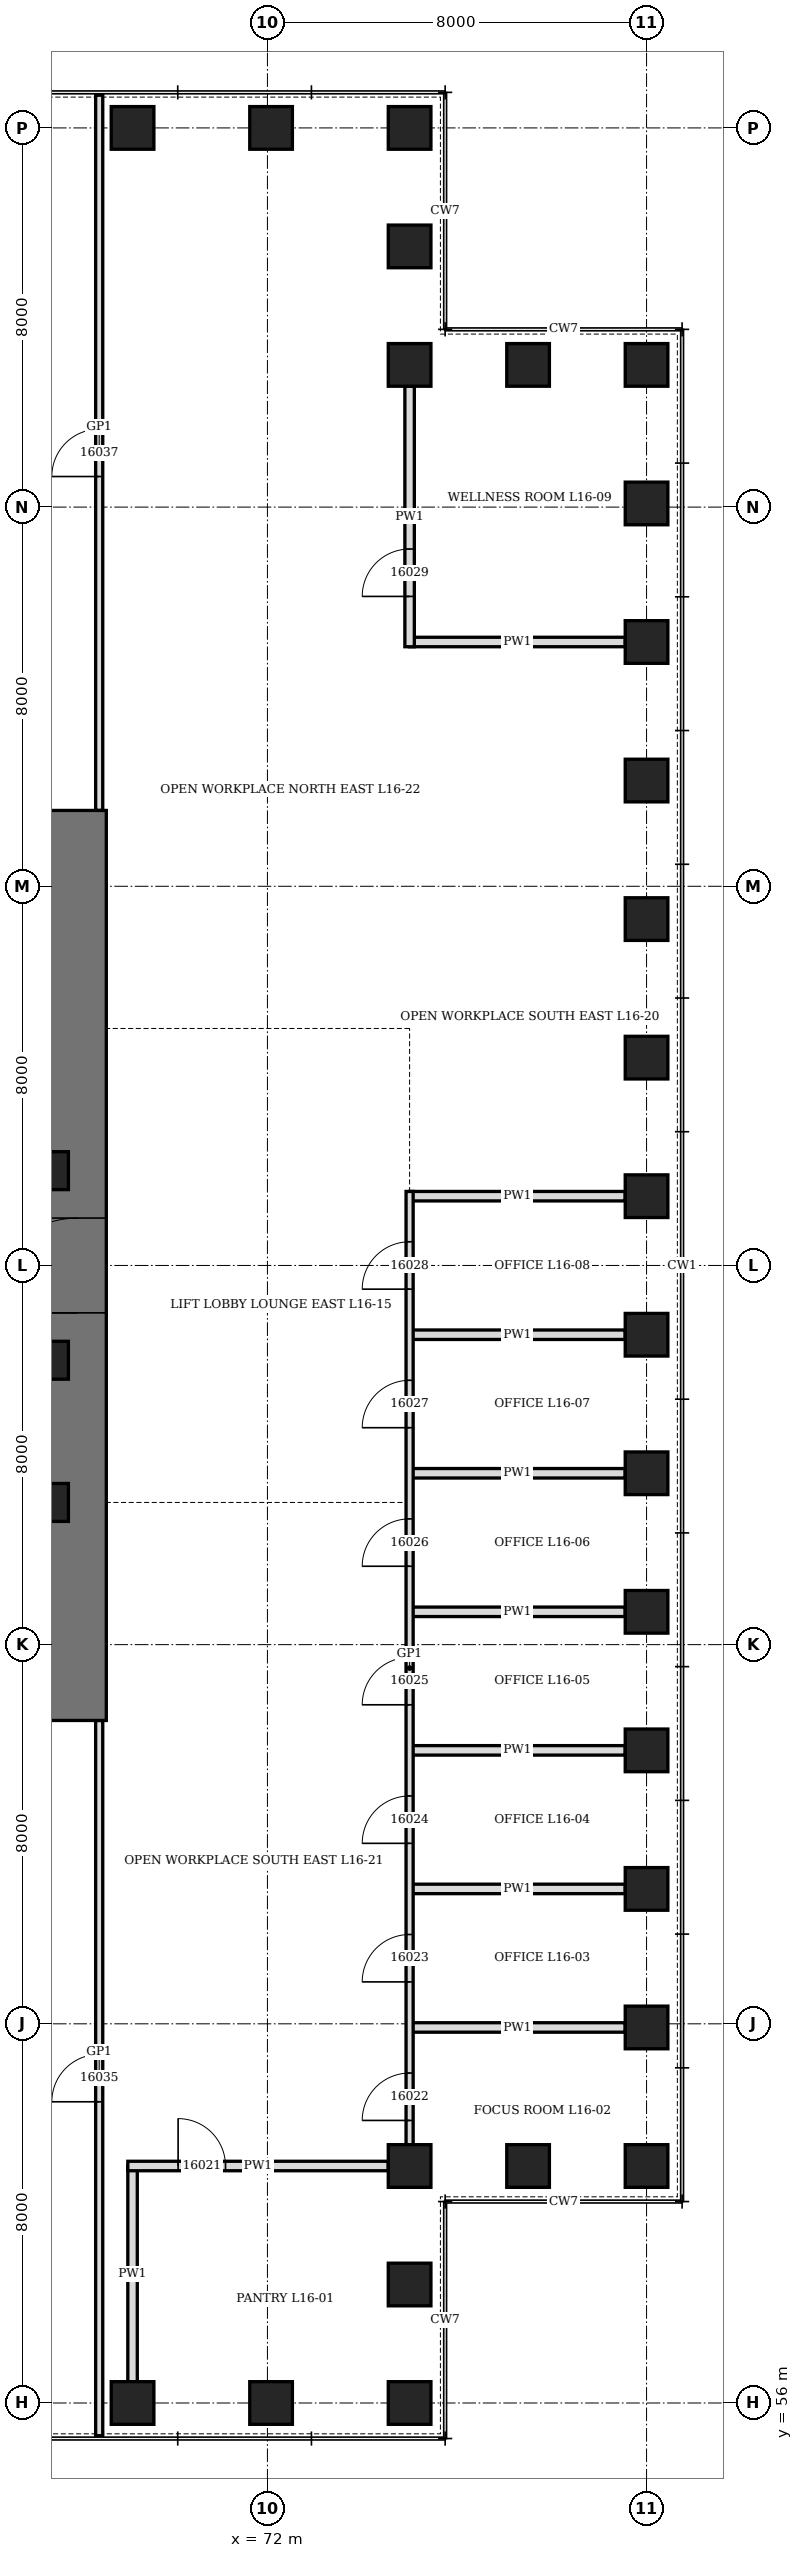
"""IFC4 building model, lengths in metres.
Left out: names, types, materials, properties, quantities, classifications, styles, units other than length and angle.
Written with IfcOpenShell. Run it as: python <this file> out.ifc"""

import sys

from ifc_helpers import new_model, si_unit, direction, frame, frame_2d, origin, origin_2d, place, context, subcontext, project, spatial, rectangle, hollow_rectangle, extrude, element, fill, save


model = new_model("IFC4")
c1 = context("Model", 3, precision=1e-05, world=origin(), true_north=direction((0.0, 1.0)))
c2 = subcontext(c1, "Body", "Model", "MODEL_VIEW")
j1 = project(units=[si_unit("LENGTHUNIT", "METRE"), si_unit("PLANEANGLEUNIT", "RADIAN")], contexts=[c1])
p1 = place(None, origin())
s1 = spatial("IfcSite", under=j1, at=p1, CompositionType="ELEMENT")
p2 = place(p1, origin())
s2 = spatial("IfcBuilding", under=s1, at=p2, CompositionType="ELEMENT")
p3 = place(p2, frame((0.0, 0.0, 76.9)))
s3 = spatial("IfcBuildingStorey", under=s2, at=p3, CompositionType="ELEMENT", Elevation=76.9)
for number, where, z_axis, x_axis in (
    (1, (69.154, 56.0, 0.0), (0.0, 0.0, 1.0), (1.0, 0.0, 0.0)),
    (2, (72.077, 56.0, 0.0), (0.0, 0.0, 1.0), (1.0, 0.0, 0.0)),
    (3, (75.0, 56.0, 0.0), (0.0, 0.0, 1.0), (0.0, 1.0, 0.0)),
    (4, (75.0, 58.5, 0.0), (0.0, 0.0, 1.0), (0.0, 1.0, 0.0)),
    (5, (75.0, 61.0, 0.0), (0.0, 0.0, 1.0), (1.0, 0.0, 0.0)),
    (6, (77.5, 61.0, 0.0), (0.0, 0.0, 1.0), (1.0, 0.0, 0.0)),
    (7, (80.0, 61.0, 0.0), (0.0, 0.0, 1.0), (0.0, 1.0, 0.0)),
    (8, (80.0, 63.923, 0.0), (0.0, 0.0, 1.0), (0.0, 1.0, 0.0)),
    (9, (80.0, 66.846, 0.0), (0.0, 0.0, 1.0), (0.0, 1.0, 0.0)),
    (10, (80.0, 69.769, 0.0), (0.0, 0.0, 1.0), (0.0, 1.0, 0.0)),
    (11, (80.0, 72.692, 0.0), (0.0, 0.0, 1.0), (0.0, 1.0, 0.0)),
    (12, (80.0, 75.615, 0.0), (0.0, 0.0, 1.0), (0.0, 1.0, 0.0)),
    (13, (80.0, 78.539, 0.0), (0.0, 0.0, 1.0), (0.0, 1.0, 0.0)),
    (14, (80.0, 81.461, 0.0), (0.0, 0.0, 1.0), (0.0, 1.0, 0.0)),
    (15, (80.0, 84.385, 0.0), (0.0, 0.0, 1.0), (0.0, 1.0, 0.0)),
    (16, (80.0, 87.308, 0.0), (0.0, 0.0, 1.0), (0.0, 1.0, 0.0)),
    (17, (80.0, 90.231, 0.0), (0.0, 0.0, 1.0), (0.0, 1.0, 0.0)),
    (18, (80.0, 93.154, 0.0), (0.0, 0.0, 1.0), (0.0, 1.0, 0.0)),
    (19, (80.0, 96.077, 0.0), (0.0, 0.0, 1.0), (0.0, 1.0, 0.0)),
    (20, (80.0, 99.0, 0.0), (0.0, 0.0, 1.0), (1.0, 0.0, 0.0)),
    (21, (77.5, 99.0, 0.0), (0.0, 0.0, 1.0), (1.0, 0.0, 0.0)),
    (22, (75.0, 99.0, 0.0), (0.0, 0.0, 1.0), (0.0, 1.0, 0.0)),
    (23, (75.0, 101.5, 0.0), (0.0, 0.0, 1.0), (0.0, 1.0, 0.0)),
    (24, (75.0, 104.0, 0.0), (0.0, 0.0, 1.0), (1.0, 0.0, 0.0)),
    (25, (72.077, 104.0, 0.0), (0.0, 0.0, 1.0), (1.0, 0.0, 0.0)),
    (26, (69.154, 104.0, 0.0), (0.0, 0.0, 1.0), (1.0, 0.0, 0.0)),
):
    element("IfcColumn", number, at=place(p3, frame(where, z_axis=z_axis, x_axis=x_axis)), inside=s3, PredefinedType="COLUMN", context=c2, shape_type="SweptSolid", body=[
        extrude(hollow_rectangle(XDim=0.9, YDim=0.9, WallThickness=0.12, at=origin_2d()), origin(), (0.0, 0.0, 1.0), 4.2),
    ])
p4 = place(p3, frame((68.0, 70.4, 0.0), z_axis=(0.0, 0.0, 1.0), x_axis=(0.0, 1.0, 0.0)))
e27 = element("IfcWall", 27, at=p4, inside=s3, PredefinedType="SHEAR", context=c2, shape_type="SweptSolid", body=[
    extrude(rectangle(XDim=19.2, YDim=1.2, at=frame_2d((9.6, 0.0))), origin(), (0.0, 0.0, 1.0), 4.2),
])
p5 = place(p4, frame((8.6, 0.0, 0.0)))
e28 = element("IfcOpeningElement", 28, at=p5, cuts=e27, PredefinedType="OPENING", context=c2, shape_type="SweptSolid", body=[
    extrude(rectangle(XDim=2.0, YDim=2.4, at=frame_2d((1.0, 1.2))), frame((0.0, 0.61, 0.0), z_axis=(0.0, -1.0, 0.0), x_axis=(1.0, 0.0, 0.0)), (0.0, 0.0, 1.0), 1.22),
])
for number, where, z_axis, x_axis in (
    (29, (67.4, 75.0, 0.0), (0.0, 0.0, 1.0), (1.0, 0.0, 0.0)),
    (30, (67.4, 78.0, 0.0), (0.0, 0.0, 1.0), (1.0, 0.0, 0.0)),
    (31, (67.4, 82.0, 0.0), (0.0, 0.0, 1.0), (1.0, 0.0, 0.0)),
):
    element("IfcColumn", number, at=place(p3, frame(where, z_axis=z_axis, x_axis=x_axis)), inside=s3, PredefinedType="COLUMN", context=c2, shape_type="SweptSolid", body=[
        extrude(hollow_rectangle(XDim=0.8, YDim=0.8, WallThickness=0.1, at=origin_2d()), origin(), (0.0, 0.0, 1.0), 4.2),
    ])
p6 = place(p3, frame((69.154, 56.45, 0.0), z_axis=(0.0, 0.0, 1.0), x_axis=(0.0, 1.0, 0.0)))
e32 = element("IfcWall", 32, at=p6, inside=s3, PredefinedType="PARTITIONING", context=c2, shape_type="SweptSolid", body=[
    extrude(rectangle(XDim=4.55, YDim=0.2, at=frame_2d((2.275, 0.0))), origin(), (0.0, 0.0, 1.0), 3.278),
])
for number, where, z_axis, x_axis in (
    (33, (75.0, 63.923, 0.0), (0.0, 0.0, 1.0), (1.0, 0.0, 0.0)),
    (34, (75.0, 66.846, 0.0), (0.0, 0.0, 1.0), (1.0, 0.0, 0.0)),
    (35, (75.0, 69.769, 0.0), (0.0, 0.0, 1.0), (1.0, 0.0, 0.0)),
    (36, (75.0, 72.692, 0.0), (0.0, 0.0, 1.0), (1.0, 0.0, 0.0)),
    (37, (75.0, 75.615, 0.0), (0.0, 0.0, 1.0), (1.0, 0.0, 0.0)),
    (38, (75.0, 78.539, 0.0), (0.0, 0.0, 1.0), (1.0, 0.0, 0.0)),
    (39, (75.0, 81.461, 0.0), (0.0, 0.0, 1.0), (1.0, 0.0, 0.0)),
    (40, (75.0, 93.154, 0.0), (0.0, 0.0, 1.0), (1.0, 0.0, 0.0)),
):
    element("IfcWall", number, at=place(p3, frame(where, z_axis=z_axis, x_axis=x_axis)), inside=s3, PredefinedType="PARTITIONING", context=c2, shape_type="SweptSolid", body=[
        extrude(rectangle(XDim=4.55, YDim=0.2, at=frame_2d((2.275, 0.0))), origin(), (0.0, 0.0, 1.0), 3.428),
    ])
p7 = place(p3, frame((69.054, 61.0, 0.0), z_axis=(0.0, 0.0, 1.0), x_axis=(1.0, 0.0, 0.0)))
e41 = element("IfcWall", 41, at=p7, inside=s3, PredefinedType="PARTITIONING", context=c2, shape_type="SweptSolid", body=[
    extrude(rectangle(XDim=5.496, YDim=0.2, at=frame_2d((2.748, 0.0))), origin(), (0.0, 0.0, 1.0), 4.04),
])
p8 = place(p7, frame((1.062, 0.0, 0.0)))
e42 = element("IfcOpeningElement", 42, at=p8, cuts=e41, PredefinedType="OPENING", context=c2, shape_type="SweptSolid", body=[
    extrude(rectangle(XDim=1.0, YDim=2.1, at=frame_2d((0.5, 1.05))), frame((0.0, 0.11, 0.0), z_axis=(0.0, -1.0, 0.0), x_axis=(1.0, 0.0, 0.0)), (0.0, 0.0, 1.0), 0.22),
])
p9 = place(p3, frame((68.45, 55.31, 0.0), z_axis=(0.0, 0.0, 1.0), x_axis=(0.0, 1.0, 0.0)))
e43 = element("IfcWall", 43, at=p9, inside=s3, PredefinedType="PARTITIONING", context=c2, shape_type="SweptSolid", body=[
    extrude(rectangle(XDim=15.09, YDim=0.15, at=frame_2d((7.545, 0.0))), origin(), (0.0, 0.0, 1.0), 4.04),
])
p10 = place(p9, frame((7.045, 0.0, 0.0)))
e44 = element("IfcOpeningElement", 44, at=p10, cuts=e43, PredefinedType="OPENING", context=c2, shape_type="SweptSolid", body=[
    extrude(rectangle(XDim=1.0, YDim=2.4, at=frame_2d((0.5, 1.2))), frame((0.0, 0.085, 0.0), z_axis=(0.0, -1.0, 0.0), x_axis=(1.0, 0.0, 0.0)), (0.0, 0.0, 1.0), 0.17),
])
p11 = place(p3, frame((68.45, 89.6, 0.0), z_axis=(0.0, 0.0, 1.0), x_axis=(0.0, 1.0, 0.0)))
e45 = element("IfcWall", 45, at=p11, inside=s3, PredefinedType="PARTITIONING", context=c2, shape_type="SweptSolid", body=[
    extrude(rectangle(XDim=15.09, YDim=0.15, at=frame_2d((7.545, 0.0))), origin(), (0.0, 0.0, 1.0), 4.04),
])
p12 = place(p11, frame((7.045, 0.0, 0.0)))
e46 = element("IfcOpeningElement", 46, at=p12, cuts=e45, PredefinedType="OPENING", context=c2, shape_type="SweptSolid", body=[
    extrude(rectangle(XDim=1.0, YDim=2.4, at=frame_2d((0.5, 1.2))), frame((0.0, 0.085, 0.0), z_axis=(0.0, -1.0, 0.0), x_axis=(1.0, 0.0, 0.0)), (0.0, 0.0, 1.0), 0.17),
])
p13 = place(p3, frame((75.0, 61.45, 0.0), z_axis=(0.0, 0.0, 1.0), x_axis=(0.0, 1.0, 0.0)))
e47 = element("IfcWall", 47, at=p13, inside=s3, PredefinedType="PARTITIONING", context=c2, shape_type="SweptSolid", body=[
    extrude(rectangle(XDim=20.112, YDim=0.15, at=frame_2d((10.056, 0.0))), origin(), (0.0, 0.0, 1.0), 4.04),
])
p14 = place(p13, frame((0.511, 0.0, 0.0)))
e48 = element("IfcOpeningElement", 48, at=p14, cuts=e47, PredefinedType="OPENING", context=c2, shape_type="SweptSolid", body=[
    extrude(rectangle(XDim=1.0, YDim=2.4, at=frame_2d((0.5, 1.2))), frame((0.0, 0.085, 0.0), z_axis=(0.0, -1.0, 0.0), x_axis=(1.0, 0.0, 0.0)), (0.0, 0.0, 1.0), 0.17),
])
p15 = place(p13, frame((3.435, 0.0, 0.0)))
e49 = element("IfcOpeningElement", 49, at=p15, cuts=e47, PredefinedType="OPENING", context=c2, shape_type="SweptSolid", body=[
    extrude(rectangle(XDim=1.0, YDim=2.1, at=frame_2d((0.5, 1.05))), frame((0.0, 0.085, 0.0), z_axis=(0.0, -1.0, 0.0), x_axis=(1.0, 0.0, 0.0)), (0.0, 0.0, 1.0), 0.17),
])
p16 = place(p13, frame((6.358, 0.0, 0.0)))
e50 = element("IfcOpeningElement", 50, at=p16, cuts=e47, PredefinedType="OPENING", context=c2, shape_type="SweptSolid", body=[
    extrude(rectangle(XDim=1.0, YDim=2.1, at=frame_2d((0.5, 1.05))), frame((0.0, 0.085, 0.0), z_axis=(0.0, -1.0, 0.0), x_axis=(1.0, 0.0, 0.0)), (0.0, 0.0, 1.0), 0.17),
])
p17 = place(p13, frame((9.281, 0.0, 0.0)))
e51 = element("IfcOpeningElement", 51, at=p17, cuts=e47, PredefinedType="OPENING", context=c2, shape_type="SweptSolid", body=[
    extrude(rectangle(XDim=1.0, YDim=2.1, at=frame_2d((0.5, 1.05))), frame((0.0, 0.085, 0.0), z_axis=(0.0, -1.0, 0.0), x_axis=(1.0, 0.0, 0.0)), (0.0, 0.0, 1.0), 0.17),
])
p18 = place(p13, frame((12.204, 0.0, 0.0)))
e52 = element("IfcOpeningElement", 52, at=p18, cuts=e47, PredefinedType="OPENING", context=c2, shape_type="SweptSolid", body=[
    extrude(rectangle(XDim=1.0, YDim=2.1, at=frame_2d((0.5, 1.05))), frame((0.0, 0.085, 0.0), z_axis=(0.0, -1.0, 0.0), x_axis=(1.0, 0.0, 0.0)), (0.0, 0.0, 1.0), 0.17),
])
p19 = place(p13, frame((15.127, 0.0, 0.0)))
e53 = element("IfcOpeningElement", 53, at=p19, cuts=e47, PredefinedType="OPENING", context=c2, shape_type="SweptSolid", body=[
    extrude(rectangle(XDim=1.0, YDim=2.1, at=frame_2d((0.5, 1.05))), frame((0.0, 0.085, 0.0), z_axis=(0.0, -1.0, 0.0), x_axis=(1.0, 0.0, 0.0)), (0.0, 0.0, 1.0), 0.17),
])
p20 = place(p13, frame((18.05, 0.0, 0.0)))
e54 = element("IfcOpeningElement", 54, at=p20, cuts=e47, PredefinedType="OPENING", context=c2, shape_type="SweptSolid", body=[
    extrude(rectangle(XDim=1.0, YDim=2.1, at=frame_2d((0.5, 1.05))), frame((0.0, 0.085, 0.0), z_axis=(0.0, -1.0, 0.0), x_axis=(1.0, 0.0, 0.0)), (0.0, 0.0, 1.0), 0.17),
])
p21 = place(p3, frame((75.0, 93.054, 0.0), z_axis=(0.0, 0.0, 1.0), x_axis=(0.0, 1.0, 0.0)))
e55 = element("IfcWall", 55, at=p21, inside=s3, PredefinedType="PARTITIONING", context=c2, shape_type="SweptSolid", body=[
    extrude(rectangle(XDim=5.496, YDim=0.2, at=frame_2d((2.748, 0.0))), origin(), (0.0, 0.0, 1.0), 4.04),
])
p22 = place(p21, frame((1.062, 0.0, 0.0)))
e56 = element("IfcOpeningElement", 56, at=p22, cuts=e55, PredefinedType="OPENING", context=c2, shape_type="SweptSolid", body=[
    extrude(rectangle(XDim=1.0, YDim=2.1, at=frame_2d((0.5, 1.05))), frame((0.0, 0.11, 0.0), z_axis=(0.0, -1.0, 0.0), x_axis=(1.0, 0.0, 0.0)), (0.0, 0.0, 1.0), 0.22),
])
p23 = place(p5, origin())
e57 = element("IfcDoor", 57, at=p23, inside=s3, OperationType="DOUBLE_DOOR_SINGLE_SWING", PredefinedType="DOOR", context=c2, shape_type="SweptSolid", body=[
    extrude(rectangle(XDim=2.0, YDim=2.4, at=frame_2d((1.0, 1.2))), frame((0.0, 0.35, 0.0), z_axis=(0.0, -1.0, 0.0), x_axis=(1.0, 0.0, 0.0)), (0.0, 0.0, 1.0), 0.7),
])
fill(e28, e57)
p24 = place(p8, origin())
e58 = element("IfcDoor", 58, at=p24, inside=s3, OperationType="SINGLE_SWING_LEFT", PredefinedType="DOOR", context=c2, shape_type="SweptSolid", body=[
    extrude(rectangle(XDim=1.0, YDim=2.1, at=frame_2d((0.5, 1.05))), frame((0.0, 0.1, 0.0), z_axis=(0.0, -1.0, 0.0), x_axis=(1.0, 0.0, 0.0)), (0.0, 0.0, 1.0), 0.199),
])
fill(e42, e58)
p25 = place(p14, origin())
e59 = element("IfcDoor", 59, at=p25, inside=s3, OperationType="SINGLE_SWING_RIGHT", PredefinedType="DOOR", context=c2, shape_type="SweptSolid", body=[
    extrude(rectangle(XDim=1.0, YDim=2.4, at=frame_2d((0.5, 1.2))), frame((0.0, 0.075, 0.0), z_axis=(0.0, -1.0, 0.0), x_axis=(1.0, 0.0, 0.0)), (0.0, 0.0, 1.0), 0.149),
])
fill(e48, e59)
p26 = place(p15, origin())
e60 = element("IfcDoor", 60, at=p26, inside=s3, OperationType="SINGLE_SWING_LEFT", PredefinedType="DOOR", context=c2, shape_type="SweptSolid", body=[
    extrude(rectangle(XDim=1.0, YDim=2.1, at=frame_2d((0.5, 1.05))), frame((0.0, 0.075, 0.0), z_axis=(0.0, -1.0, 0.0), x_axis=(1.0, 0.0, 0.0)), (0.0, 0.0, 1.0), 0.149),
])
fill(e49, e60)
p27 = place(p16, origin())
e61 = element("IfcDoor", 61, at=p27, inside=s3, OperationType="SINGLE_SWING_LEFT", PredefinedType="DOOR", context=c2, shape_type="SweptSolid", body=[
    extrude(rectangle(XDim=1.0, YDim=2.1, at=frame_2d((0.5, 1.05))), frame((0.0, 0.075, 0.0), z_axis=(0.0, -1.0, 0.0), x_axis=(1.0, 0.0, 0.0)), (0.0, 0.0, 1.0), 0.149),
])
fill(e50, e61)
p28 = place(p17, origin())
e62 = element("IfcDoor", 62, at=p28, inside=s3, OperationType="SINGLE_SWING_LEFT", PredefinedType="DOOR", context=c2, shape_type="SweptSolid", body=[
    extrude(rectangle(XDim=1.0, YDim=2.1, at=frame_2d((0.5, 1.05))), frame((0.0, 0.075, 0.0), z_axis=(0.0, -1.0, 0.0), x_axis=(1.0, 0.0, 0.0)), (0.0, 0.0, 1.0), 0.149),
])
fill(e51, e62)
p29 = place(p18, origin())
e63 = element("IfcDoor", 63, at=p29, inside=s3, OperationType="SINGLE_SWING_LEFT", PredefinedType="DOOR", context=c2, shape_type="SweptSolid", body=[
    extrude(rectangle(XDim=1.0, YDim=2.1, at=frame_2d((0.5, 1.05))), frame((0.0, 0.075, 0.0), z_axis=(0.0, -1.0, 0.0), x_axis=(1.0, 0.0, 0.0)), (0.0, 0.0, 1.0), 0.149),
])
fill(e52, e63)
p30 = place(p19, origin())
e64 = element("IfcDoor", 64, at=p30, inside=s3, OperationType="SINGLE_SWING_LEFT", PredefinedType="DOOR", context=c2, shape_type="SweptSolid", body=[
    extrude(rectangle(XDim=1.0, YDim=2.1, at=frame_2d((0.5, 1.05))), frame((0.0, 0.075, 0.0), z_axis=(0.0, -1.0, 0.0), x_axis=(1.0, 0.0, 0.0)), (0.0, 0.0, 1.0), 0.149),
])
fill(e53, e64)
p31 = place(p20, origin())
e65 = element("IfcDoor", 65, at=p31, inside=s3, OperationType="SINGLE_SWING_LEFT", PredefinedType="DOOR", context=c2, shape_type="SweptSolid", body=[
    extrude(rectangle(XDim=1.0, YDim=2.1, at=frame_2d((0.5, 1.05))), frame((0.0, 0.075, 0.0), z_axis=(0.0, -1.0, 0.0), x_axis=(1.0, 0.0, 0.0)), (0.0, 0.0, 1.0), 0.149),
])
fill(e54, e65)
p32 = place(p22, origin())
e66 = element("IfcDoor", 66, at=p32, inside=s3, OperationType="SINGLE_SWING_LEFT", PredefinedType="DOOR", context=c2, shape_type="SweptSolid", body=[
    extrude(rectangle(XDim=1.0, YDim=2.1, at=frame_2d((0.5, 1.05))), frame((0.0, 0.1, 0.0), z_axis=(0.0, -1.0, 0.0), x_axis=(1.0, 0.0, 0.0)), (0.0, 0.0, 1.0), 0.199),
])
fill(e56, e66)
p33 = place(p10, origin())
e67 = element("IfcDoor", 67, at=p33, inside=s3, OperationType="SINGLE_SWING_RIGHT", PredefinedType="DOOR", context=c2, shape_type="SweptSolid", body=[
    extrude(rectangle(XDim=1.0, YDim=2.4, at=frame_2d((0.5, 1.2))), frame((0.0, 0.075, 0.0), z_axis=(0.0, -1.0, 0.0), x_axis=(1.0, 0.0, 0.0)), (0.0, 0.0, 1.0), 0.149),
])
fill(e44, e67)
p34 = place(p12, origin())
e68 = element("IfcDoor", 68, at=p34, inside=s3, OperationType="SINGLE_SWING_RIGHT", PredefinedType="DOOR", context=c2, shape_type="SweptSolid", body=[
    extrude(rectangle(XDim=1.0, YDim=2.4, at=frame_2d((0.5, 1.2))), frame((0.0, 0.075, 0.0), z_axis=(0.0, -1.0, 0.0), x_axis=(1.0, 0.0, 0.0)), (0.0, 0.0, 1.0), 0.149),
])
fill(e46, e68)
save(model, sys.argv[1])
